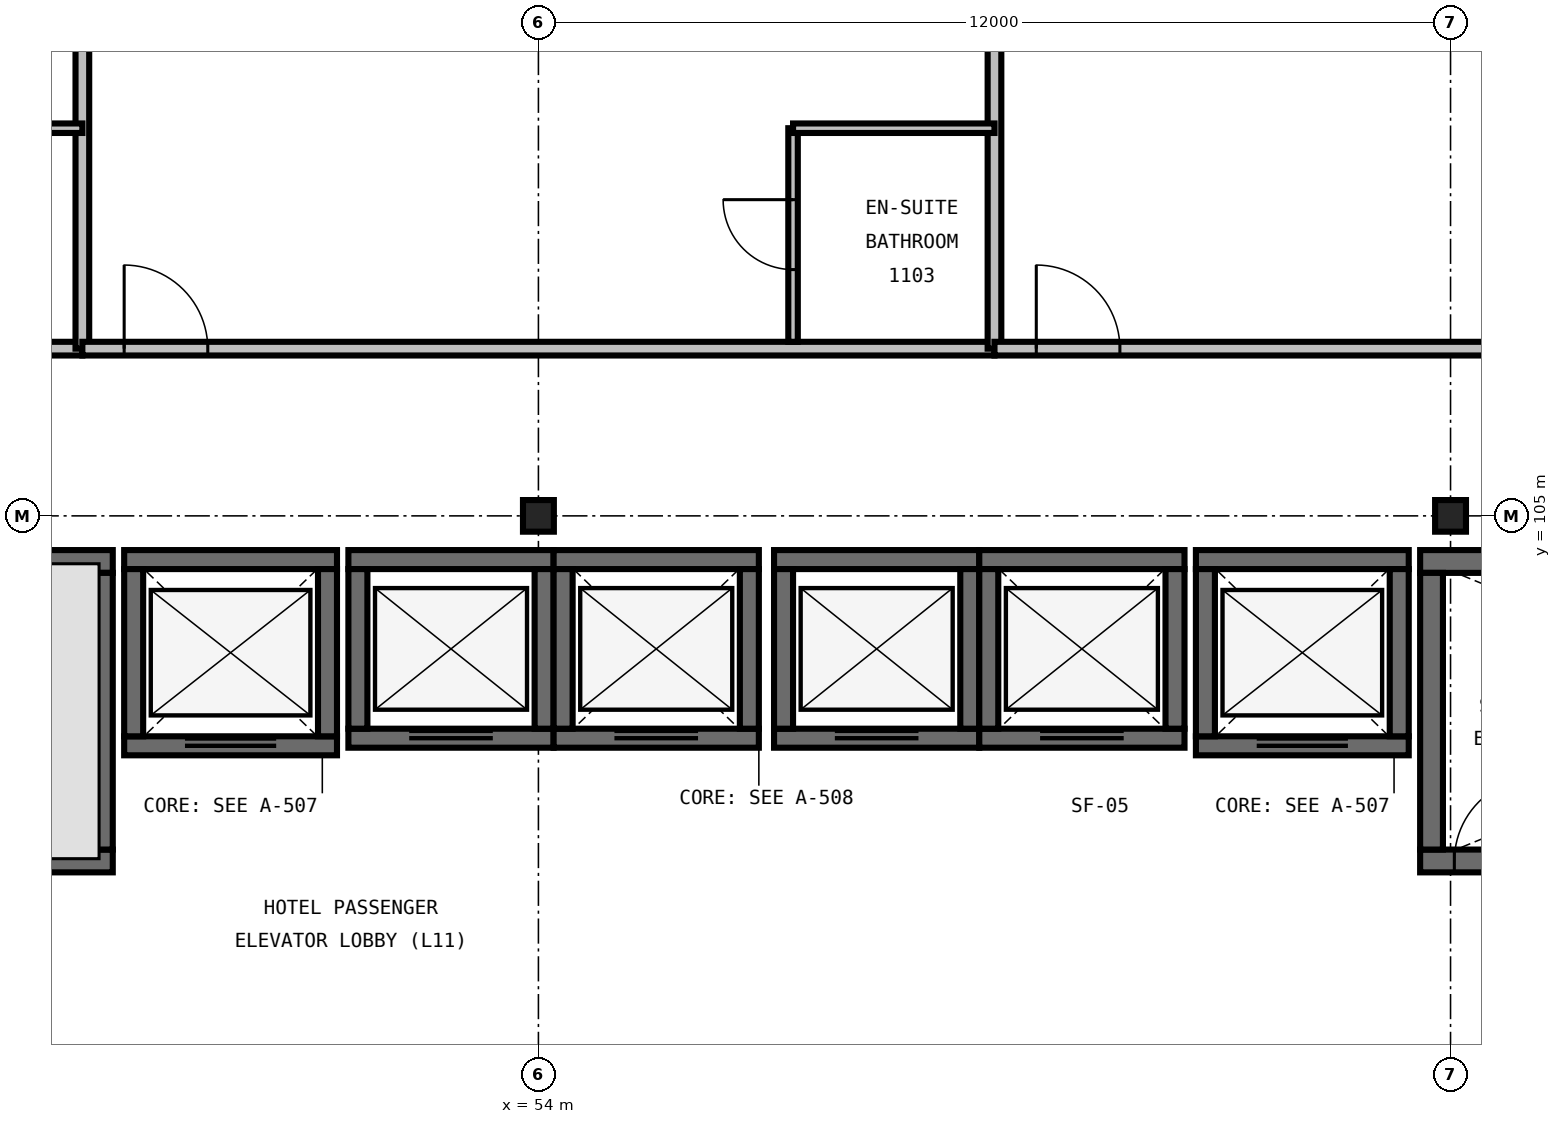
"""IFC4 building model, lengths in metres.
Left out: names, types, materials, properties, quantities, classifications, styles, units other than length and angle.
Written with IfcOpenShell. Run it as: python <this file> out.ifc"""

import sys

from ifc_helpers import new_model, si_unit, direction, frame, frame_2d, origin, origin_2d, place, context, subcontext, project, spatial, rectangle, i_section, extrude, element, fill, save


model = new_model("IFC4")
c1 = context("Model", 3, precision=1e-05, world=origin(), true_north=direction((0.0, 1.0)))
c2 = subcontext(c1, "Body", "Model", "MODEL_VIEW")
j1 = project(units=[si_unit("LENGTHUNIT", "METRE"), si_unit("PLANEANGLEUNIT", "RADIAN")], contexts=[c1])
p1 = place(None, origin())
s1 = spatial("IfcSite", under=j1, at=p1, CompositionType="ELEMENT")
p2 = place(p1, origin())
s2 = spatial("IfcBuilding", under=s1, at=p2, CompositionType="ELEMENT")
p3 = place(p2, frame((0.0, 0.0, 49.2)))
s3 = spatial("IfcBuildingStorey", under=s2, at=p3, CompositionType="ELEMENT", Elevation=49.2)
for number, where, z_axis, x_axis in (
    (1, (54.0, 105.0, 0.0), (0.0, 0.0, 1.0), (1.0, 0.0, 0.0)),
    (2, (66.0, 105.0, 0.0), (0.0, 0.0, 1.0), (1.0, 0.0, 0.0)),
):
    element("IfcColumn", number, at=place(p3, frame(where, z_axis=z_axis, x_axis=x_axis)), inside=s3, PredefinedType="COLUMN", context=c2, shape_type="SweptSolid", body=[
        extrude(i_section(OverallWidth=0.406, OverallDepth=0.416, WebThickness=0.03, FlangeThickness=0.048, FilletRadius=0.031, at=origin_2d()), origin(), (0.0, 0.0, 1.0), 3.6),
    ])
p4 = place(p3, frame((38.6, 100.46, 0.0), z_axis=(0.0, 0.0, 1.0), x_axis=(1.0, 0.0, 0.0)))
e3 = element("IfcWall", 3, at=p4, inside=s3, PredefinedType="SHEAR", context=c2, shape_type="SweptSolid", body=[
    extrude(rectangle(XDim=9.8, YDim=0.3, at=frame_2d((4.9, 0.0))), origin(), (0.0, 0.0, 1.0), 3.6),
])
p5 = place(p4, frame((0.45, 0.0, 0.0)))
e4 = element("IfcOpeningElement", 4, at=p5, cuts=e3, PredefinedType="OPENING", context=c2, shape_type="SweptSolid", body=[
    extrude(rectangle(XDim=1.1, YDim=2.2, at=frame_2d((0.55, 1.1))), frame((0.0, 0.165, 0.0), z_axis=(0.0, -1.0, 0.0), x_axis=(1.0, 0.0, 0.0)), (0.0, 0.0, 1.0), 0.33),
])
p6 = place(p3, frame((48.4, 104.4, 0.0), z_axis=(0.0, 0.0, 1.0), x_axis=(-1.0, 0.0, 0.0)))
e5 = element("IfcWall", 5, at=p6, inside=s3, PredefinedType="SHEAR", context=c2, shape_type="SweptSolid", body=[
    extrude(rectangle(XDim=9.8, YDim=0.3, at=frame_2d((4.9, 0.0))), origin(), (0.0, 0.0, 1.0), 3.6),
])
p7 = place(p3, frame((48.25, 100.61, 0.0), z_axis=(0.0, 0.0, 1.0), x_axis=(0.0, 1.0, 0.0)))
e6 = element("IfcWall", 6, at=p7, inside=s3, PredefinedType="SHEAR", context=c2, shape_type="SweptSolid", body=[
    extrude(rectangle(XDim=3.64, YDim=0.3, at=frame_2d((1.82, 0.0))), origin(), (0.0, 0.0, 1.0), 3.6),
])
p8 = place(p3, frame((65.6, 100.46, 0.0), z_axis=(0.0, 0.0, 1.0), x_axis=(1.0, 0.0, 0.0)))
e7 = element("IfcWall", 7, at=p8, inside=s3, PredefinedType="SHEAR", context=c2, shape_type="SweptSolid", body=[
    extrude(rectangle(XDim=9.8, YDim=0.3, at=frame_2d((4.9, 0.0))), origin(), (0.0, 0.0, 1.0), 3.6),
])
p9 = place(p8, frame((0.45, 0.0, 0.0)))
e8 = element("IfcOpeningElement", 8, at=p9, cuts=e7, PredefinedType="OPENING", context=c2, shape_type="SweptSolid", body=[
    extrude(rectangle(XDim=1.1, YDim=2.2, at=frame_2d((0.55, 1.1))), frame((0.0, 0.165, 0.0), z_axis=(0.0, -1.0, 0.0), x_axis=(1.0, 0.0, 0.0)), (0.0, 0.0, 1.0), 0.33),
])
p10 = place(p3, frame((75.4, 104.4, 0.0), z_axis=(0.0, 0.0, 1.0), x_axis=(-1.0, 0.0, 0.0)))
e9 = element("IfcWall", 9, at=p10, inside=s3, PredefinedType="SHEAR", context=c2, shape_type="SweptSolid", body=[
    extrude(rectangle(XDim=9.8, YDim=0.3, at=frame_2d((4.9, 0.0))), origin(), (0.0, 0.0, 1.0), 3.6),
])
p11 = place(p3, frame((65.75, 104.25, 0.0), z_axis=(0.0, 0.0, 1.0), x_axis=(0.0, -1.0, 0.0)))
e10 = element("IfcWall", 10, at=p11, inside=s3, PredefinedType="SHEAR", context=c2, shape_type="SweptSolid", body=[
    extrude(rectangle(XDim=3.64, YDim=0.3, at=frame_2d((1.82, 0.0))), origin(), (0.0, 0.0, 1.0), 3.6),
])
p12 = place(p3, frame((48.55, 101.975, 0.0), z_axis=(0.0, 0.0, 1.0), x_axis=(1.0, 0.0, 0.0)))
e11 = element("IfcWall", 11, at=p12, inside=s3, PredefinedType="SHEAR", context=c2, shape_type="SweptSolid", body=[
    extrude(rectangle(XDim=2.8, YDim=0.25, at=frame_2d((1.4, 0.0))), origin(), (0.0, 0.0, 1.0), 3.6),
])
p13 = place(p12, frame((0.8, 0.0, 0.0)))
e12 = element("IfcOpeningElement", 12, at=p13, cuts=e11, PredefinedType="OPENING", context=c2, shape_type="SweptSolid", body=[
    extrude(rectangle(XDim=1.2, YDim=2.2, at=frame_2d((0.6, 1.1))), frame((0.0, 0.14, 0.0), z_axis=(0.0, -1.0, 0.0), x_axis=(1.0, 0.0, 0.0)), (0.0, 0.0, 1.0), 0.28),
])
p14 = place(p3, frame((51.35, 104.425, 0.0), z_axis=(0.0, 0.0, 1.0), x_axis=(-1.0, 0.0, 0.0)))
e13 = element("IfcWall", 13, at=p14, inside=s3, PredefinedType="SHEAR", context=c2, shape_type="SweptSolid", body=[
    extrude(rectangle(XDim=2.8, YDim=0.25, at=frame_2d((1.4, 0.0))), origin(), (0.0, 0.0, 1.0), 3.6),
])
for number, where, z_axis, x_axis in (
    (14, (48.675, 104.3, 0.0), (0.0, 0.0, 1.0), (0.0, -1.0, 0.0)),
    (15, (51.225, 102.1, 0.0), (0.0, 0.0, 1.0), (0.0, 1.0, 0.0)),
):
    element("IfcWall", number, at=place(p3, frame(where, z_axis=z_axis, x_axis=x_axis)), inside=s3, PredefinedType="SHEAR", context=c2, shape_type="SweptSolid", body=[
        extrude(rectangle(XDim=2.2, YDim=0.25, at=frame_2d((1.1, 0.0))), origin(), (0.0, 0.0, 1.0), 3.6),
    ])
p15 = place(p3, frame((62.65, 101.975, 0.0), z_axis=(0.0, 0.0, 1.0), x_axis=(1.0, 0.0, 0.0)))
e16 = element("IfcWall", 16, at=p15, inside=s3, PredefinedType="SHEAR", context=c2, shape_type="SweptSolid", body=[
    extrude(rectangle(XDim=2.8, YDim=0.25, at=frame_2d((1.4, 0.0))), origin(), (0.0, 0.0, 1.0), 3.6),
])
p16 = place(p15, frame((0.8, 0.0, 0.0)))
e17 = element("IfcOpeningElement", 17, at=p16, cuts=e16, PredefinedType="OPENING", context=c2, shape_type="SweptSolid", body=[
    extrude(rectangle(XDim=1.2, YDim=2.2, at=frame_2d((0.6, 1.1))), frame((0.0, 0.14, 0.0), z_axis=(0.0, -1.0, 0.0), x_axis=(1.0, 0.0, 0.0)), (0.0, 0.0, 1.0), 0.28),
])
p17 = place(p3, frame((65.45, 104.425, 0.0), z_axis=(0.0, 0.0, 1.0), x_axis=(-1.0, 0.0, 0.0)))
e18 = element("IfcWall", 18, at=p17, inside=s3, PredefinedType="SHEAR", context=c2, shape_type="SweptSolid", body=[
    extrude(rectangle(XDim=2.8, YDim=0.25, at=frame_2d((1.4, 0.0))), origin(), (0.0, 0.0, 1.0), 3.6),
])
for number, where, z_axis, x_axis in (
    (19, (62.775, 104.3, 0.0), (0.0, 0.0, 1.0), (0.0, -1.0, 0.0)),
    (20, (65.325, 102.1, 0.0), (0.0, 0.0, 1.0), (0.0, 1.0, 0.0)),
):
    element("IfcWall", number, at=place(p3, frame(where, z_axis=z_axis, x_axis=x_axis)), inside=s3, PredefinedType="SHEAR", context=c2, shape_type="SweptSolid", body=[
        extrude(rectangle(XDim=2.2, YDim=0.25, at=frame_2d((1.1, 0.0))), origin(), (0.0, 0.0, 1.0), 3.6),
    ])
p18 = place(p3, frame((51.5, 102.075, 0.0), z_axis=(0.0, 0.0, 1.0), x_axis=(1.0, 0.0, 0.0)))
e21 = element("IfcWall", 21, at=p18, inside=s3, PredefinedType="SHEAR", context=c2, shape_type="SweptSolid", body=[
    extrude(rectangle(XDim=2.7, YDim=0.25, at=frame_2d((1.35, 0.0))), origin(), (0.0, 0.0, 1.0), 3.6),
])
p19 = place(p18, frame((0.8, 0.0, 0.0)))
e22 = element("IfcOpeningElement", 22, at=p19, cuts=e21, PredefinedType="OPENING", context=c2, shape_type="SweptSolid", body=[
    extrude(rectangle(XDim=1.1, YDim=2.2, at=frame_2d((0.55, 1.1))), frame((0.0, 0.14, 0.0), z_axis=(0.0, -1.0, 0.0), x_axis=(1.0, 0.0, 0.0)), (0.0, 0.0, 1.0), 0.28),
])
p20 = place(p3, frame((54.2, 104.425, 0.0), z_axis=(0.0, 0.0, 1.0), x_axis=(-1.0, 0.0, 0.0)))
e23 = element("IfcWall", 23, at=p20, inside=s3, PredefinedType="SHEAR", context=c2, shape_type="SweptSolid", body=[
    extrude(rectangle(XDim=2.7, YDim=0.25, at=frame_2d((1.35, 0.0))), origin(), (0.0, 0.0, 1.0), 3.6),
])
for number, where, z_axis, x_axis in (
    (24, (51.625, 104.3, 0.0), (0.0, 0.0, 1.0), (0.0, -1.0, 0.0)),
    (25, (54.075, 102.2, 0.0), (0.0, 0.0, 1.0), (0.0, 1.0, 0.0)),
):
    element("IfcWall", number, at=place(p3, frame(where, z_axis=z_axis, x_axis=x_axis)), inside=s3, PredefinedType="SHEAR", context=c2, shape_type="SweptSolid", body=[
        extrude(rectangle(XDim=2.1, YDim=0.25, at=frame_2d((1.05, 0.0))), origin(), (0.0, 0.0, 1.0), 3.6),
    ])
p21 = place(p3, frame((54.2, 102.075, 0.0), z_axis=(0.0, 0.0, 1.0), x_axis=(1.0, 0.0, 0.0)))
e26 = element("IfcWall", 26, at=p21, inside=s3, PredefinedType="SHEAR", context=c2, shape_type="SweptSolid", body=[
    extrude(rectangle(XDim=2.7, YDim=0.25, at=frame_2d((1.35, 0.0))), origin(), (0.0, 0.0, 1.0), 3.6),
])
p22 = place(p21, frame((0.8, 0.0, 0.0)))
e27 = element("IfcOpeningElement", 27, at=p22, cuts=e26, PredefinedType="OPENING", context=c2, shape_type="SweptSolid", body=[
    extrude(rectangle(XDim=1.1, YDim=2.2, at=frame_2d((0.55, 1.1))), frame((0.0, 0.14, 0.0), z_axis=(0.0, -1.0, 0.0), x_axis=(1.0, 0.0, 0.0)), (0.0, 0.0, 1.0), 0.28),
])
p23 = place(p3, frame((56.9, 104.425, 0.0), z_axis=(0.0, 0.0, 1.0), x_axis=(-1.0, 0.0, 0.0)))
e28 = element("IfcWall", 28, at=p23, inside=s3, PredefinedType="SHEAR", context=c2, shape_type="SweptSolid", body=[
    extrude(rectangle(XDim=2.7, YDim=0.25, at=frame_2d((1.35, 0.0))), origin(), (0.0, 0.0, 1.0), 3.6),
])
for number, where, z_axis, x_axis in (
    (29, (54.325, 104.3, 0.0), (0.0, 0.0, 1.0), (0.0, -1.0, 0.0)),
    (30, (56.775, 102.2, 0.0), (0.0, 0.0, 1.0), (0.0, 1.0, 0.0)),
):
    element("IfcWall", number, at=place(p3, frame(where, z_axis=z_axis, x_axis=x_axis)), inside=s3, PredefinedType="SHEAR", context=c2, shape_type="SweptSolid", body=[
        extrude(rectangle(XDim=2.1, YDim=0.25, at=frame_2d((1.05, 0.0))), origin(), (0.0, 0.0, 1.0), 3.6),
    ])
p24 = place(p3, frame((57.1, 102.075, 0.0), z_axis=(0.0, 0.0, 1.0), x_axis=(1.0, 0.0, 0.0)))
e31 = element("IfcWall", 31, at=p24, inside=s3, PredefinedType="SHEAR", context=c2, shape_type="SweptSolid", body=[
    extrude(rectangle(XDim=2.7, YDim=0.25, at=frame_2d((1.35, 0.0))), origin(), (0.0, 0.0, 1.0), 3.6),
])
p25 = place(p24, frame((0.8, 0.0, 0.0)))
e32 = element("IfcOpeningElement", 32, at=p25, cuts=e31, PredefinedType="OPENING", context=c2, shape_type="SweptSolid", body=[
    extrude(rectangle(XDim=1.1, YDim=2.2, at=frame_2d((0.55, 1.1))), frame((0.0, 0.14, 0.0), z_axis=(0.0, -1.0, 0.0), x_axis=(1.0, 0.0, 0.0)), (0.0, 0.0, 1.0), 0.28),
])
p26 = place(p3, frame((59.8, 104.425, 0.0), z_axis=(0.0, 0.0, 1.0), x_axis=(-1.0, 0.0, 0.0)))
e33 = element("IfcWall", 33, at=p26, inside=s3, PredefinedType="SHEAR", context=c2, shape_type="SweptSolid", body=[
    extrude(rectangle(XDim=2.7, YDim=0.25, at=frame_2d((1.35, 0.0))), origin(), (0.0, 0.0, 1.0), 3.6),
])
for number, where, z_axis, x_axis in (
    (34, (57.225, 104.3, 0.0), (0.0, 0.0, 1.0), (0.0, -1.0, 0.0)),
    (35, (59.675, 102.2, 0.0), (0.0, 0.0, 1.0), (0.0, 1.0, 0.0)),
):
    element("IfcWall", number, at=place(p3, frame(where, z_axis=z_axis, x_axis=x_axis)), inside=s3, PredefinedType="SHEAR", context=c2, shape_type="SweptSolid", body=[
        extrude(rectangle(XDim=2.1, YDim=0.25, at=frame_2d((1.05, 0.0))), origin(), (0.0, 0.0, 1.0), 3.6),
    ])
p27 = place(p3, frame((59.8, 102.075, 0.0), z_axis=(0.0, 0.0, 1.0), x_axis=(1.0, 0.0, 0.0)))
e36 = element("IfcWall", 36, at=p27, inside=s3, PredefinedType="SHEAR", context=c2, shape_type="SweptSolid", body=[
    extrude(rectangle(XDim=2.7, YDim=0.25, at=frame_2d((1.35, 0.0))), origin(), (0.0, 0.0, 1.0), 3.6),
])
p28 = place(p27, frame((0.8, 0.0, 0.0)))
e37 = element("IfcOpeningElement", 37, at=p28, cuts=e36, PredefinedType="OPENING", context=c2, shape_type="SweptSolid", body=[
    extrude(rectangle(XDim=1.1, YDim=2.2, at=frame_2d((0.55, 1.1))), frame((0.0, 0.14, 0.0), z_axis=(0.0, -1.0, 0.0), x_axis=(1.0, 0.0, 0.0)), (0.0, 0.0, 1.0), 0.28),
])
p29 = place(p3, frame((62.5, 104.425, 0.0), z_axis=(0.0, 0.0, 1.0), x_axis=(-1.0, 0.0, 0.0)))
e38 = element("IfcWall", 38, at=p29, inside=s3, PredefinedType="SHEAR", context=c2, shape_type="SweptSolid", body=[
    extrude(rectangle(XDim=2.7, YDim=0.25, at=frame_2d((1.35, 0.0))), origin(), (0.0, 0.0, 1.0), 3.6),
])
for number, where, z_axis, x_axis in (
    (39, (59.925, 104.3, 0.0), (0.0, 0.0, 1.0), (0.0, -1.0, 0.0)),
    (40, (62.375, 102.2, 0.0), (0.0, 0.0, 1.0), (0.0, 1.0, 0.0)),
):
    element("IfcWall", number, at=place(p3, frame(where, z_axis=z_axis, x_axis=x_axis)), inside=s3, PredefinedType="SHEAR", context=c2, shape_type="SweptSolid", body=[
        extrude(rectangle(XDim=2.1, YDim=0.25, at=frame_2d((1.05, 0.0))), origin(), (0.0, 0.0, 1.0), 3.6),
    ])
p30 = place(p3, frame((36.0, 107.2, 0.0), z_axis=(0.0, 0.0, 1.0), x_axis=(1.0, 0.0, 0.0)))
e41 = element("IfcWall", 41, at=p30, inside=s3, PredefinedType="PARTITIONING", context=c2, shape_type="SweptSolid", body=[
    extrude(rectangle(XDim=12.0, YDim=0.18, at=frame_2d((6.0, 0.0))), origin(), (0.0, 0.0, 1.0), 3.29),
])
p31 = place(p30, frame((0.55, 0.0, 0.0)))
e42 = element("IfcOpeningElement", 42, at=p31, cuts=e41, PredefinedType="OPENING", context=c2, shape_type="SweptSolid", body=[
    extrude(rectangle(XDim=1.1, YDim=2.2, at=frame_2d((0.55, 1.1))), frame((0.0, 0.105, 0.0), z_axis=(0.0, -1.0, 0.0), x_axis=(1.0, 0.0, 0.0)), (0.0, 0.0, 1.0), 0.21),
])
p32 = place(p3, frame((48.0, 107.2, 0.0), z_axis=(0.0, 0.0, 1.0), x_axis=(0.0, 1.0, 0.0)))
e43 = element("IfcWall", 43, at=p32, inside=s3, PredefinedType="PARTITIONING", context=c2, shape_type="SweptSolid", body=[
    extrude(rectangle(XDim=9.64, YDim=0.18, at=frame_2d((4.82, 0.0))), origin(), (0.0, 0.0, 1.0), 3.29),
])
p33 = place(p3, frame((45.35, 110.1, 0.0), z_axis=(0.0, 0.0, 1.0), x_axis=(1.0, 0.0, 0.0)))
e44 = element("IfcWall", 44, at=p33, inside=s3, PredefinedType="PARTITIONING", context=c2, shape_type="SweptSolid", body=[
    extrude(rectangle(XDim=2.65, YDim=0.125, at=frame_2d((1.325, 0.0))), origin(), (0.0, 0.0, 1.0), 3.29),
])
p34 = place(p3, frame((48.0, 107.2, 0.0), z_axis=(0.0, 0.0, 1.0), x_axis=(1.0, 0.0, 0.0)))
e45 = element("IfcWall", 45, at=p34, inside=s3, PredefinedType="PARTITIONING", context=c2, shape_type="SweptSolid", body=[
    extrude(rectangle(XDim=12.0, YDim=0.18, at=frame_2d((6.0, 0.0))), origin(), (0.0, 0.0, 1.0), 3.29),
])
p35 = place(p34, frame((0.55, 0.0, 0.0)))
e46 = element("IfcOpeningElement", 46, at=p35, cuts=e45, PredefinedType="OPENING", context=c2, shape_type="SweptSolid", body=[
    extrude(rectangle(XDim=1.1, YDim=2.2, at=frame_2d((0.55, 1.1))), frame((0.0, 0.105, 0.0), z_axis=(0.0, -1.0, 0.0), x_axis=(1.0, 0.0, 0.0)), (0.0, 0.0, 1.0), 0.21),
])
p36 = place(p3, frame((60.0, 107.2, 0.0), z_axis=(0.0, 0.0, 1.0), x_axis=(0.0, 1.0, 0.0)))
e47 = element("IfcWall", 47, at=p36, inside=s3, PredefinedType="PARTITIONING", context=c2, shape_type="SweptSolid", body=[
    extrude(rectangle(XDim=9.64, YDim=0.18, at=frame_2d((4.82, 0.0))), origin(), (0.0, 0.0, 1.0), 3.29),
])
p37 = place(p3, frame((57.35, 107.29, 0.0), z_axis=(0.0, 0.0, 1.0), x_axis=(0.0, 1.0, 0.0)))
e48 = element("IfcWall", 48, at=p37, inside=s3, PredefinedType="PARTITIONING", context=c2, shape_type="SweptSolid", body=[
    extrude(rectangle(XDim=2.81, YDim=0.125, at=frame_2d((1.405, 0.0))), origin(), (0.0, 0.0, 1.0), 3.29),
])
p38 = place(p37, frame((0.95, 0.0, 0.0)))
e49 = element("IfcOpeningElement", 49, at=p38, cuts=e48, PredefinedType="OPENING", context=c2, shape_type="SweptSolid", body=[
    extrude(rectangle(XDim=0.92, YDim=2.1, at=frame_2d((0.46, 1.05))), frame((0.0, 0.077, 0.0), z_axis=(0.0, -1.0, 0.0), x_axis=(1.0, 0.0, 0.0)), (0.0, 0.0, 1.0), 0.155),
])
p39 = place(p3, frame((57.35, 110.1, 0.0), z_axis=(0.0, 0.0, 1.0), x_axis=(1.0, 0.0, 0.0)))
e50 = element("IfcWall", 50, at=p39, inside=s3, PredefinedType="PARTITIONING", context=c2, shape_type="SweptSolid", body=[
    extrude(rectangle(XDim=2.65, YDim=0.125, at=frame_2d((1.325, 0.0))), origin(), (0.0, 0.0, 1.0), 3.29),
])
p40 = place(p3, frame((60.0, 107.2, 0.0), z_axis=(0.0, 0.0, 1.0), x_axis=(1.0, 0.0, 0.0)))
e51 = element("IfcWall", 51, at=p40, inside=s3, PredefinedType="PARTITIONING", context=c2, shape_type="SweptSolid", body=[
    extrude(rectangle(XDim=12.0, YDim=0.18, at=frame_2d((6.0, 0.0))), origin(), (0.0, 0.0, 1.0), 3.29),
])
p41 = place(p40, frame((0.55, 0.0, 0.0)))
e52 = element("IfcOpeningElement", 52, at=p41, cuts=e51, PredefinedType="OPENING", context=c2, shape_type="SweptSolid", body=[
    extrude(rectangle(XDim=1.1, YDim=2.2, at=frame_2d((0.55, 1.1))), frame((0.0, 0.105, 0.0), z_axis=(0.0, -1.0, 0.0), x_axis=(1.0, 0.0, 0.0)), (0.0, 0.0, 1.0), 0.21),
])
p42 = place(p9, origin())
e53 = element("IfcDoor", 53, at=p42, inside=s3, OperationType="SINGLE_SWING_RIGHT", PredefinedType="DOOR", context=c2, shape_type="SweptSolid", body=[
    extrude(rectangle(XDim=1.1, YDim=2.2, at=frame_2d((0.55, 1.1))), frame((0.0, 0.025, 0.0), z_axis=(0.0, -1.0, 0.0), x_axis=(1.0, 0.0, 0.0)), (0.0, 0.0, 1.0), 0.05),
])
fill(e8, e53)
p43 = place(p13, origin())
e54 = element("IfcDoor", 54, at=p43, inside=s3, OperationType="DOUBLE_DOOR_SLIDING", PredefinedType="DOOR", context=c2, shape_type="SweptSolid", body=[
    extrude(rectangle(XDim=1.2, YDim=2.2, at=frame_2d((0.6, 1.1))), frame((0.0, 0.025, 0.0), z_axis=(0.0, -1.0, 0.0), x_axis=(1.0, 0.0, 0.0)), (0.0, 0.0, 1.0), 0.05),
])
fill(e12, e54)
p44 = place(p16, origin())
e55 = element("IfcDoor", 55, at=p44, inside=s3, OperationType="DOUBLE_DOOR_SLIDING", PredefinedType="DOOR", context=c2, shape_type="SweptSolid", body=[
    extrude(rectangle(XDim=1.2, YDim=2.2, at=frame_2d((0.6, 1.1))), frame((0.0, 0.025, 0.0), z_axis=(0.0, -1.0, 0.0), x_axis=(1.0, 0.0, 0.0)), (0.0, 0.0, 1.0), 0.05),
])
fill(e17, e55)
p45 = place(p19, origin())
e56 = element("IfcDoor", 56, at=p45, inside=s3, OperationType="DOUBLE_DOOR_SLIDING", PredefinedType="DOOR", context=c2, shape_type="SweptSolid", body=[
    extrude(rectangle(XDim=1.1, YDim=2.2, at=frame_2d((0.55, 1.1))), frame((0.0, 0.025, 0.0), z_axis=(0.0, -1.0, 0.0), x_axis=(1.0, 0.0, 0.0)), (0.0, 0.0, 1.0), 0.05),
])
fill(e22, e56)
p46 = place(p22, origin())
e57 = element("IfcDoor", 57, at=p46, inside=s3, OperationType="DOUBLE_DOOR_SLIDING", PredefinedType="DOOR", context=c2, shape_type="SweptSolid", body=[
    extrude(rectangle(XDim=1.1, YDim=2.2, at=frame_2d((0.55, 1.1))), frame((0.0, 0.025, 0.0), z_axis=(0.0, -1.0, 0.0), x_axis=(1.0, 0.0, 0.0)), (0.0, 0.0, 1.0), 0.05),
])
fill(e27, e57)
p47 = place(p25, origin())
e58 = element("IfcDoor", 58, at=p47, inside=s3, OperationType="DOUBLE_DOOR_SLIDING", PredefinedType="DOOR", context=c2, shape_type="SweptSolid", body=[
    extrude(rectangle(XDim=1.1, YDim=2.2, at=frame_2d((0.55, 1.1))), frame((0.0, 0.025, 0.0), z_axis=(0.0, -1.0, 0.0), x_axis=(1.0, 0.0, 0.0)), (0.0, 0.0, 1.0), 0.05),
])
fill(e32, e58)
p48 = place(p28, origin())
e59 = element("IfcDoor", 59, at=p48, inside=s3, OperationType="DOUBLE_DOOR_SLIDING", PredefinedType="DOOR", context=c2, shape_type="SweptSolid", body=[
    extrude(rectangle(XDim=1.1, YDim=2.2, at=frame_2d((0.55, 1.1))), frame((0.0, 0.025, 0.0), z_axis=(0.0, -1.0, 0.0), x_axis=(1.0, 0.0, 0.0)), (0.0, 0.0, 1.0), 0.05),
])
fill(e37, e59)
p49 = place(p35, origin())
e60 = element("IfcDoor", 60, at=p49, inside=s3, OperationType="SINGLE_SWING_LEFT", PredefinedType="DOOR", context=c2, shape_type="SweptSolid", body=[
    extrude(rectangle(XDim=1.1, YDim=2.2, at=frame_2d((0.55, 1.1))), frame((0.0, 0.025, 0.0), z_axis=(0.0, -1.0, 0.0), x_axis=(1.0, 0.0, 0.0)), (0.0, 0.0, 1.0), 0.05),
])
fill(e46, e60)
p50 = place(p38, origin())
e61 = element("IfcDoor", 61, at=p50, inside=s3, OperationType="SINGLE_SWING_RIGHT", PredefinedType="DOOR", context=c2, shape_type="SweptSolid", body=[
    extrude(rectangle(XDim=0.92, YDim=2.1, at=frame_2d((0.46, 1.05))), frame((0.0, 0.025, 0.0), z_axis=(0.0, -1.0, 0.0), x_axis=(1.0, 0.0, 0.0)), (0.0, 0.0, 1.0), 0.05),
])
fill(e49, e61)
p51 = place(p41, origin())
e62 = element("IfcDoor", 62, at=p51, inside=s3, OperationType="SINGLE_SWING_LEFT", PredefinedType="DOOR", context=c2, shape_type="SweptSolid", body=[
    extrude(rectangle(XDim=1.1, YDim=2.2, at=frame_2d((0.55, 1.1))), frame((0.0, 0.025, 0.0), z_axis=(0.0, -1.0, 0.0), x_axis=(1.0, 0.0, 0.0)), (0.0, 0.0, 1.0), 0.05),
])
fill(e52, e62)
save(model, sys.argv[1])
